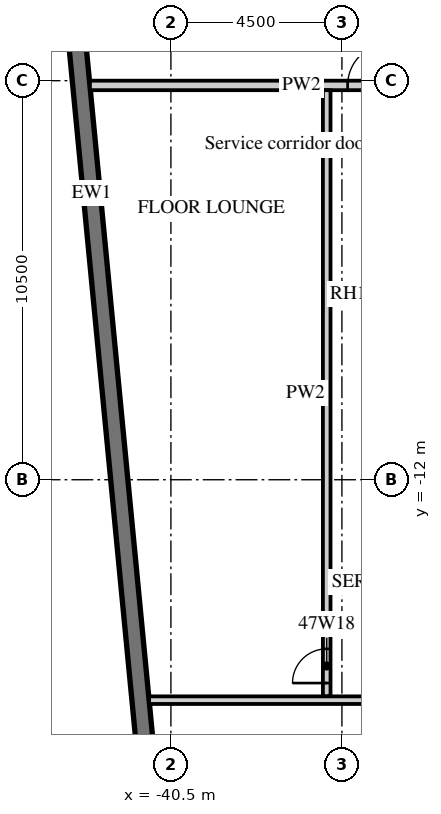
"""IFC4 building model, lengths in metres.
Left out: names, types, materials, properties, quantities, classifications, styles, units other than length and angle.
Written with IfcOpenShell. Run it as: python <this file> out.ifc"""

import sys

from ifc_helpers import new_model, si_unit, direction, frame, frame_2d, origin, place, context, subcontext, project, spatial, rectangle, extrude, element, fill, save


model = new_model("IFC4")
c1 = context("Model", 3, precision=1e-05, world=origin(), true_north=direction((0.0, 1.0)))
c2 = subcontext(c1, "Body", "Model", "MODEL_VIEW")
j1 = project(units=[si_unit("LENGTHUNIT", "METRE"), si_unit("PLANEANGLEUNIT", "RADIAN")], contexts=[c1])
p1 = place(None, origin())
s1 = spatial("IfcSite", under=j1, at=p1, CompositionType="ELEMENT")
p2 = place(p1, origin())
s2 = spatial("IfcBuilding", under=s1, at=p2, CompositionType="ELEMENT")
p3 = place(p2, frame((0.0, 0.0, 196.6)))
s3 = spatial("IfcBuildingStorey", under=s2, at=p3, CompositionType="ELEMENT", Elevation=196.6)
p4 = place(p3, frame((-44.214, 12.466, 0.0), z_axis=(0.0, 0.0, 1.0), x_axis=(0.095847314626, -0.995396047952, 0.0)))
e1 = element("IfcWall", 1, at=p4, inside=s3, PredefinedType="SOLIDWALL", context=c2, shape_type="SweptSolid", body=[
    extrude(rectangle(XDim=34.0, YDim=0.45, at=frame_2d((17.0, 0.0))), origin(), (0.0, 0.0, 1.0), 3.02),
])
p5 = place(p4, frame((2.865, 0.0, 0.45)))
e2 = element("IfcOpeningElement", 2, at=p5, cuts=e1, PredefinedType="OPENING", context=c2, shape_type="SweptSolid", body=[
    extrude(rectangle(XDim=3.3, YDim=2.25, at=frame_2d((1.65, 1.125))), frame((0.0, 0.235, 0.0), z_axis=(0.0, -1.0, 0.0), x_axis=(1.0, 0.0, 0.0)), (0.0, 0.0, 1.0), 0.47),
])
p6 = place(p4, frame((7.386, 0.0, 0.45)))
e3 = element("IfcOpeningElement", 3, at=p6, cuts=e1, PredefinedType="OPENING", context=c2, shape_type="SweptSolid", body=[
    extrude(rectangle(XDim=3.3, YDim=2.25, at=frame_2d((1.65, 1.125))), frame((0.0, 0.235, 0.0), z_axis=(0.0, -1.0, 0.0), x_axis=(1.0, 0.0, 0.0)), (0.0, 0.0, 1.0), 0.47),
])
p7 = place(p3, frame((-42.632, -1.625, 0.0), z_axis=(0.0, 0.0, 1.0), x_axis=(1.0, 0.0, 0.0)))
e4 = element("IfcWall", 4, at=p7, inside=s3, PredefinedType="PARTITIONING", context=c2, shape_type="SweptSolid", body=[
    extrude(rectangle(XDim=11.132, YDim=0.25, at=frame_2d((5.566, 0.0))), origin(), (0.0, 0.0, 1.0), 3.02),
])
p8 = place(p7, frame((9.207, 0.0, 0.0)))
e5 = element("IfcOpeningElement", 5, at=p8, cuts=e4, PredefinedType="OPENING", context=c2, shape_type="SweptSolid", body=[
    extrude(rectangle(XDim=1.3, YDim=2.1, at=frame_2d((0.65, 1.05))), frame((0.0, 0.135, 0.0), z_axis=(0.0, -1.0, 0.0), x_axis=(1.0, 0.0, 0.0)), (0.0, 0.0, 1.0), 0.27),
])
p9 = place(p7, frame((6.781, 0.0, 0.0)))
e6 = element("IfcOpeningElement", 6, at=p9, cuts=e4, PredefinedType="OPENING", context=c2, shape_type="SweptSolid", body=[
    extrude(rectangle(XDim=1.1, YDim=2.1, at=frame_2d((0.55, 1.05))), frame((0.0, 0.135, 0.0), z_axis=(0.0, -1.0, 0.0), x_axis=(1.0, 0.0, 0.0)), (0.0, 0.0, 1.0), 0.27),
])
p10 = place(p3, frame((-36.4, -17.7, 0.0), z_axis=(0.0, 0.0, 1.0), x_axis=(0.0, 1.0, 0.0)))
e7 = element("IfcWall", 7, at=p10, inside=s3, PredefinedType="PARTITIONING", context=c2, shape_type="SweptSolid", body=[
    extrude(rectangle(XDim=15.95, YDim=0.2, at=frame_2d((7.975, 0.0))), origin(), (0.0, 0.0, 1.0), 3.02),
])
p11 = place(p10, frame((0.35, 0.0, 0.0)))
e8 = element("IfcOpeningElement", 8, at=p11, cuts=e7, PredefinedType="OPENING", context=c2, shape_type="SweptSolid", body=[
    extrude(rectangle(XDim=0.9, YDim=2.1, at=frame_2d((0.45, 1.05))), frame((0.0, 0.11, 0.0), z_axis=(0.0, -1.0, 0.0), x_axis=(1.0, 0.0, 0.0)), (0.0, 0.0, 1.0), 0.22),
])
p12 = place(p3, frame((-41.074, -17.8, 0.0), z_axis=(0.0, 0.0, 1.0), x_axis=(1.0, 0.0, 0.0)))
e9 = element("IfcWall", 9, at=p12, inside=s3, PredefinedType="PARTITIONING", context=c2, shape_type="SweptSolid", body=[
    extrude(rectangle(XDim=27.474, YDim=0.2, at=frame_2d((13.737, 0.0))), origin(), (0.0, 0.0, 1.0), 3.02),
])
p13 = place(p12, frame((9.962, 0.0, 0.0)))
e10 = element("IfcOpeningElement", 10, at=p13, cuts=e9, PredefinedType="OPENING", context=c2, shape_type="SweptSolid", body=[
    extrude(rectangle(XDim=0.9, YDim=2.1, at=frame_2d((0.45, 1.05))), frame((0.0, 0.11, 0.0), z_axis=(0.0, -1.0, 0.0), x_axis=(1.0, 0.0, 0.0)), (0.0, 0.0, 1.0), 0.22),
])
p14 = place(p12, frame((18.262, 0.0, 0.0)))
e11 = element("IfcOpeningElement", 11, at=p14, cuts=e9, PredefinedType="OPENING", context=c2, shape_type="SweptSolid", body=[
    extrude(rectangle(XDim=0.9, YDim=2.1, at=frame_2d((0.45, 1.05))), frame((0.0, 0.11, 0.0), z_axis=(0.0, -1.0, 0.0), x_axis=(1.0, 0.0, 0.0)), (0.0, 0.0, 1.0), 0.22),
])
p15 = place(p9, origin())
e12 = element("IfcDoor", 12, at=p15, inside=s3, OperationType="SINGLE_SWING_RIGHT", PredefinedType="DOOR", context=c2, shape_type="SweptSolid", body=[
    extrude(rectangle(XDim=1.1, YDim=2.1, at=frame_2d((0.55, 1.05))), frame((0.0, 0.025, 0.0), z_axis=(0.0, -1.0, 0.0), x_axis=(1.0, 0.0, 0.0)), (0.0, 0.0, 1.0), 0.05),
])
fill(e6, e12)
p16 = place(p11, origin())
e13 = element("IfcDoor", 13, at=p16, inside=s3, OperationType="SINGLE_SWING_LEFT", PredefinedType="DOOR", context=c2, shape_type="SweptSolid", body=[
    extrude(rectangle(XDim=0.9, YDim=2.1, at=frame_2d((0.45, 1.05))), frame((0.0, 0.025, 0.0), z_axis=(0.0, -1.0, 0.0), x_axis=(1.0, 0.0, 0.0)), (0.0, 0.0, 1.0), 0.05),
])
fill(e8, e13)
save(model, sys.argv[1])
